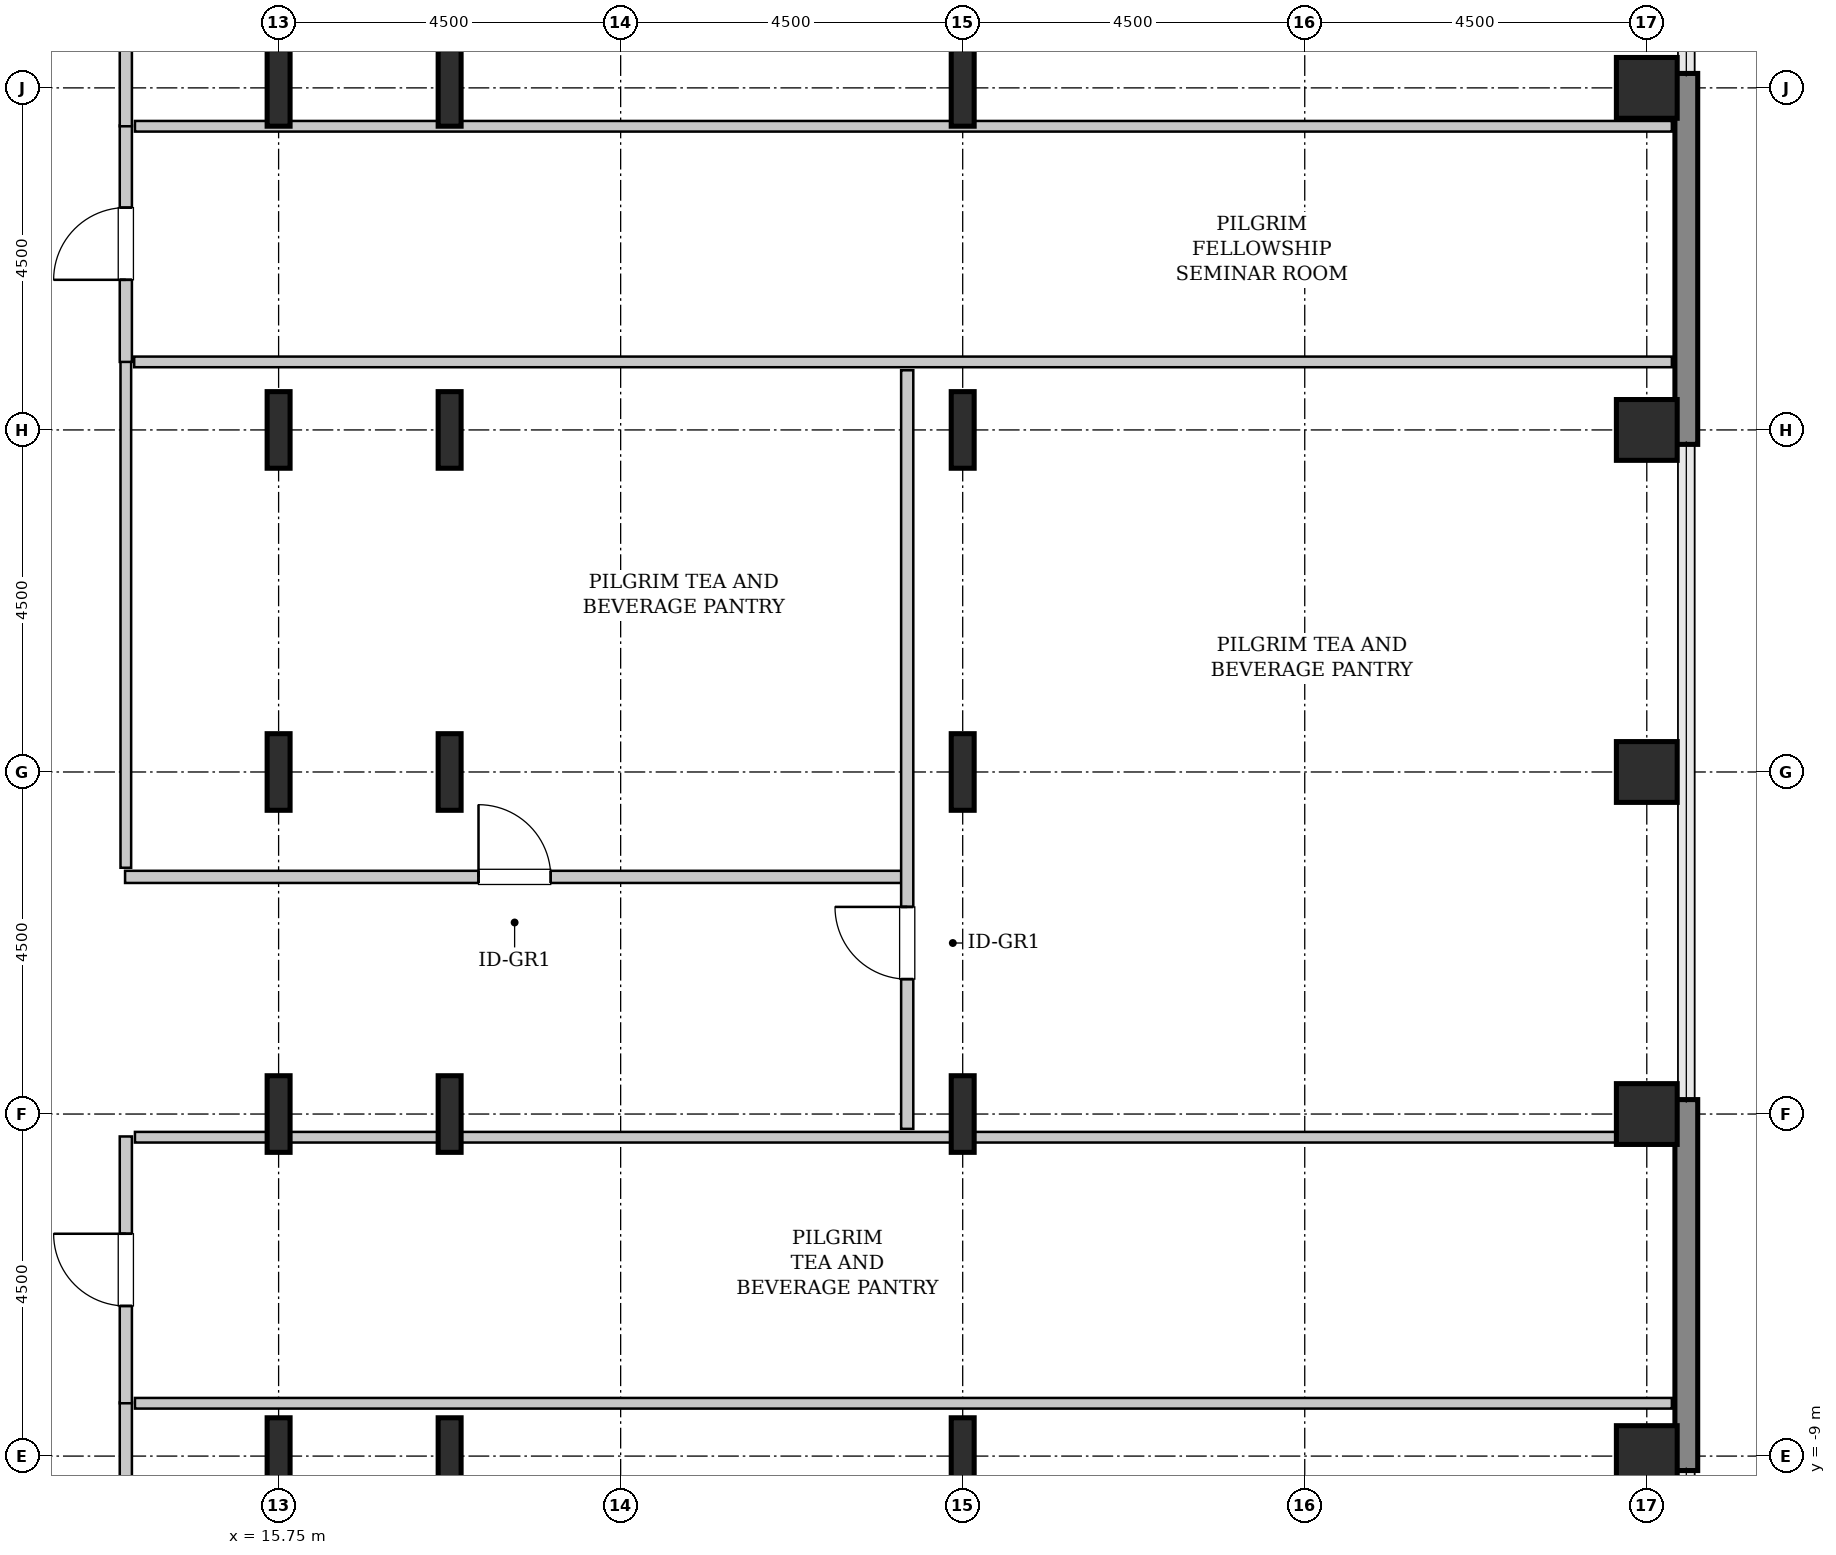
"""IFC4 building model, lengths in metres.
Left out: names, types, materials, properties, quantities, classifications, styles, units other than length and angle.
Written with IfcOpenShell. Run it as: python <this file> out.ifc"""

import sys

from ifc_helpers import new_model, si_unit, direction, frame, frame_2d, origin, origin_2d, place, context, subcontext, project, spatial, rectangle, hollow_rectangle, i_section, extrude, source, transform, mapped, element, fill, save


model = new_model("IFC4")
c1 = context("Model", 3, precision=1e-05, world=origin(), true_north=direction((0.0, 1.0)))
c2 = subcontext(c1, "Body", "Model", "MODEL_VIEW")
j1 = project(units=[si_unit("LENGTHUNIT", "METRE"), si_unit("PLANEANGLEUNIT", "RADIAN")], contexts=[c1])
p1 = place(None, origin())
s1 = spatial("IfcSite", under=j1, at=p1, CompositionType="ELEMENT")
p2 = place(p1, origin())
s2 = spatial("IfcBuilding", under=s1, at=p2, CompositionType="ELEMENT")
p3 = place(p2, frame((0.0, 0.0, 125.0)))
s3 = spatial("IfcBuildingStorey", under=s2, at=p3, CompositionType="ELEMENT", Elevation=125.0)
m1 = source(origin(), c2, "Body", "SweptSolid", [
    extrude(i_section(OverallWidth=0.302, OverallDepth=1.008, WebThickness=0.021, FlangeThickness=0.04, FilletRadius=0.03, at=origin_2d()), origin(), (0.0, 0.0, 1.0), 3.8),
])
for number, where, z_axis, x_axis in (
    (1, (15.75, -9.0, 0.0), (0.0, 0.0, 1.0), (1.0, 0.0, 0.0)),
    (2, (15.75, -4.5, 0.0), (0.0, 0.0, 1.0), (1.0, 0.0, 0.0)),
    (3, (15.75, 0.0, 0.0), (0.0, 0.0, 1.0), (1.0, 0.0, 0.0)),
    (4, (15.75, 4.5, 0.0), (0.0, 0.0, 1.0), (1.0, 0.0, 0.0)),
    (5, (15.75, 9.0, 0.0), (0.0, 0.0, 1.0), (1.0, 0.0, 0.0)),
    (6, (18.0, -9.0, 0.0), (0.0, 0.0, 1.0), (1.0, 0.0, 0.0)),
    (7, (18.0, -4.5, 0.0), (0.0, 0.0, 1.0), (1.0, 0.0, 0.0)),
    (8, (18.0, 0.0, 0.0), (0.0, 0.0, 1.0), (1.0, 0.0, 0.0)),
    (9, (18.0, 4.5, 0.0), (0.0, 0.0, 1.0), (1.0, 0.0, 0.0)),
    (10, (18.0, 9.0, 0.0), (0.0, 0.0, 1.0), (1.0, 0.0, 0.0)),
    (11, (24.75, -9.0, 0.0), (0.0, 0.0, 1.0), (1.0, 0.0, 0.0)),
    (12, (24.75, -4.5, 0.0), (0.0, 0.0, 1.0), (1.0, 0.0, 0.0)),
    (13, (24.75, 0.0, 0.0), (0.0, 0.0, 1.0), (1.0, 0.0, 0.0)),
    (14, (24.75, 4.5, 0.0), (0.0, 0.0, 1.0), (1.0, 0.0, 0.0)),
    (15, (24.75, 9.0, 0.0), (0.0, 0.0, 1.0), (1.0, 0.0, 0.0)),
):
    element("IfcColumn", number, at=place(p3, frame(where, z_axis=z_axis, x_axis=x_axis)), inside=s3, PredefinedType="COLUMN", context=c2, shape_type="MappedRepresentation", body=[
        mapped(m1, transform((0.0, 0.0, 0.0), x_axis=(1.0, 0.0, 0.0), y_axis=(0.0, 1.0, 0.0), z_axis=(0.0, 0.0, 1.0), scale=1.0)),
    ])
m2 = source(origin(), c2, "Body", "SweptSolid", [
    extrude(hollow_rectangle(XDim=0.8, YDim=0.8, WallThickness=0.04, InnerFilletRadius=0.04, OuterFilletRadius=0.08, at=origin_2d()), origin(), (0.0, 0.0, 1.0), 3.8),
])
for number, where, z_axis, x_axis in (
    (16, (33.75, -9.0, 0.0), (0.0, 0.0, 1.0), (1.0, 0.0, 0.0)),
    (17, (33.75, -4.5, 0.0), (0.0, 0.0, 1.0), (1.0, 0.0, 0.0)),
    (18, (33.75, 0.0, 0.0), (0.0, 0.0, 1.0), (1.0, 0.0, 0.0)),
    (19, (33.75, 4.5, 0.0), (0.0, 0.0, 1.0), (1.0, 0.0, 0.0)),
    (20, (33.75, 9.0, 0.0), (0.0, 0.0, 1.0), (1.0, 0.0, 0.0)),
):
    element("IfcColumn", number, at=place(p3, frame(where, z_axis=z_axis, x_axis=x_axis)), inside=s3, PredefinedType="COLUMN", context=c2, shape_type="MappedRepresentation", body=[
        mapped(m2, transform((0.0, 0.0, 0.0), x_axis=(1.0, 0.0, 0.0), y_axis=(0.0, 1.0, 0.0), z_axis=(0.0, 0.0, 1.0), scale=1.0)),
    ])
m3 = source(origin(), c2, "Body", "SweptSolid", [
    extrude(rectangle(XDim=4.88, YDim=0.3, at=frame_2d((2.44, 0.0))), origin(), (0.0, 0.0, 1.0), 3.55),
])
for number, where, z_axis, x_axis in (
    (21, (34.27, -9.19, 0.0), (0.0, 0.0, 1.0), (0.0, 1.0, 0.0)),
    (22, (34.27, 4.31, 0.0), (0.0, 0.0, 1.0), (0.0, 1.0, 0.0)),
):
    element("IfcWall", number, at=place(p3, frame(where, z_axis=z_axis, x_axis=x_axis)), inside=s3, PredefinedType="SHEAR", context=c2, shape_type="MappedRepresentation", body=[
        mapped(m3, transform((0.0, 0.0, 0.0), x_axis=(1.0, 0.0, 0.0), y_axis=(0.0, 1.0, 0.0), z_axis=(0.0, 0.0, 1.0), scale=1.0)),
    ])
m4 = source(origin(), c2, "Body", "SweptSolid", [
    extrude(rectangle(XDim=14.745, YDim=0.16, at=frame_2d((7.373, 0.0))), origin(), (0.0, 0.0, 1.0), 3.535),
])
p4 = place(p3, frame((13.74, -23.04, 0.0), z_axis=(0.0, 0.0, 1.0), x_axis=(0.0, 1.0, 0.0)))
e23 = element("IfcWall", 23, at=p4, inside=s3, PredefinedType="PARTITIONING", context=c2, shape_type="MappedRepresentation", body=[
    mapped(m4, transform((0.0, 0.0, 0.0), x_axis=(1.0, 0.0, 0.0), y_axis=(0.0, 1.0, 0.0), z_axis=(0.0, 0.0, 1.0), scale=1.0)),
])
p5 = place(p4, frame((12.663, 0.0, 0.0)))
e24 = element("IfcOpeningElement", 24, at=p5, cuts=e23, PredefinedType="OPENING", context=c2, shape_type="SweptSolid", body=[
    extrude(rectangle(XDim=0.95, YDim=2.1, at=frame_2d((0.475, 1.05))), frame((0.0, 0.09, 0.0), z_axis=(0.0, -1.0, 0.0), x_axis=(1.0, 0.0, 0.0)), (0.0, 0.0, 1.0), 0.18),
])
m5 = source(origin(), c2, "Body", "SweptSolid", [
    extrude(rectangle(XDim=20.22, YDim=0.14, at=frame_2d((10.11, 0.0))), origin(), (0.0, 0.0, 1.0), 3.535),
])
p6 = place(p3, frame((13.86, -8.305, 0.0), z_axis=(0.0, 0.0, 1.0), x_axis=(1.0, 0.0, 0.0)))
e25 = element("IfcWall", 25, at=p6, inside=s3, PredefinedType="PARTITIONING", context=c2, shape_type="MappedRepresentation", body=[
    mapped(m5, transform((0.0, 0.0, 0.0), x_axis=(1.0, 0.0, 0.0), y_axis=(0.0, 1.0, 0.0), z_axis=(0.0, 0.0, 1.0), scale=1.0)),
])
m6 = source(origin(), c2, "Body", "SweptSolid", [
    extrude(rectangle(XDim=3.51, YDim=0.16, at=frame_2d((1.755, 0.0))), origin(), (0.0, 0.0, 1.0), 3.535),
])
p7 = place(p3, frame((13.74, -8.305, 0.0), z_axis=(0.0, 0.0, 1.0), x_axis=(0.0, 1.0, 0.0)))
e26 = element("IfcWall", 26, at=p7, inside=s3, PredefinedType="PARTITIONING", context=c2, shape_type="MappedRepresentation", body=[
    mapped(m6, transform((0.0, 0.0, 0.0), x_axis=(1.0, 0.0, 0.0), y_axis=(0.0, 1.0, 0.0), z_axis=(0.0, 0.0, 1.0), scale=1.0)),
])
p8 = place(p7, frame((1.28, 0.0, 0.0)))
e27 = element("IfcOpeningElement", 27, at=p8, cuts=e26, PredefinedType="OPENING", context=c2, shape_type="SweptSolid", body=[
    extrude(rectangle(XDim=0.95, YDim=2.1, at=frame_2d((0.475, 1.05))), frame((0.0, 0.09, 0.0), z_axis=(0.0, -1.0, 0.0), x_axis=(1.0, 0.0, 0.0)), (0.0, 0.0, 1.0), 0.18),
])
m7 = source(origin(), c2, "Body", "SweptSolid", [
    extrude(rectangle(XDim=20.22, YDim=0.14, at=frame_2d((10.11, 0.0))), origin(), (0.0, 0.0, 1.0), 2.875),
])
p9 = place(p3, frame((13.86, -4.805, 0.0), z_axis=(0.0, 0.0, 1.0), x_axis=(1.0, 0.0, 0.0)))
e28 = element("IfcWall", 28, at=p9, inside=s3, PredefinedType="PARTITIONING", context=c2, shape_type="MappedRepresentation", body=[
    mapped(m7, transform((0.0, 0.0, 0.0), x_axis=(1.0, 0.0, 0.0), y_axis=(0.0, 1.0, 0.0), z_axis=(0.0, 0.0, 1.0), scale=1.0)),
])
m8 = source(origin(), c2, "Body", "SweptSolid", [
    extrude(rectangle(XDim=10.25, YDim=0.16, at=frame_2d((5.125, 0.0))), origin(), (0.0, 0.0, 1.0), 3.535),
])
p10 = place(p3, frame((13.73, -1.38, 0.0), z_axis=(0.0, 0.0, 1.0), x_axis=(1.0, 0.0, 0.0)))
e29 = element("IfcWall", 29, at=p10, inside=s3, PredefinedType="PARTITIONING", context=c2, shape_type="MappedRepresentation", body=[
    mapped(m8, transform((0.0, 0.0, 0.0), x_axis=(1.0, 0.0, 0.0), y_axis=(0.0, 1.0, 0.0), z_axis=(0.0, 0.0, 1.0), scale=1.0)),
])
p11 = place(p10, frame((4.65, 0.0, 0.0)))
e30 = element("IfcOpeningElement", 30, at=p11, cuts=e29, PredefinedType="OPENING", context=c2, shape_type="SweptSolid", body=[
    extrude(rectangle(XDim=0.95, YDim=2.1, at=frame_2d((0.475, 1.05))), frame((0.0, 0.09, 0.0), z_axis=(0.0, -1.0, 0.0), x_axis=(1.0, 0.0, 0.0)), (0.0, 0.0, 1.0), 0.18),
])
m9 = source(origin(), c2, "Body", "SweptSolid", [
    extrude(rectangle(XDim=6.665, YDim=0.14, at=frame_2d((3.333, 0.0))), origin(), (0.0, 0.0, 1.0), 3.535),
])
p12 = place(p3, frame((13.74, -1.26, 0.0), z_axis=(0.0, 0.0, 1.0), x_axis=(0.0, 1.0, 0.0)))
e31 = element("IfcWall", 31, at=p12, inside=s3, PredefinedType="PARTITIONING", context=c2, shape_type="MappedRepresentation", body=[
    mapped(m9, transform((0.0, 0.0, 0.0), x_axis=(1.0, 0.0, 0.0), y_axis=(0.0, 1.0, 0.0), z_axis=(0.0, 0.0, 1.0), scale=1.0)),
])
m10 = source(origin(), c2, "Body", "SweptSolid", [
    extrude(rectangle(XDim=20.23, YDim=0.14, at=frame_2d((10.115, 0.0))), origin(), (0.0, 0.0, 1.0), 3.535),
])
p13 = place(p3, frame((13.85, 5.395, 0.0), z_axis=(0.0, 0.0, 1.0), x_axis=(1.0, 0.0, 0.0)))
e32 = element("IfcWall", 32, at=p13, inside=s3, PredefinedType="PARTITIONING", context=c2, shape_type="MappedRepresentation", body=[
    mapped(m10, transform((0.0, 0.0, 0.0), x_axis=(1.0, 0.0, 0.0), y_axis=(0.0, 1.0, 0.0), z_axis=(0.0, 0.0, 1.0), scale=1.0)),
])
m11 = source(origin(), c2, "Body", "SweptSolid", [
    extrude(rectangle(XDim=9.98, YDim=0.16, at=frame_2d((4.99, 0.0))), origin(), (0.0, 0.0, 1.0), 3.535),
])
p14 = place(p3, frame((24.02, -4.695, 0.0), z_axis=(0.0, 0.0, 1.0), x_axis=(0.0, 1.0, 0.0)))
e33 = element("IfcWall", 33, at=p14, inside=s3, PredefinedType="PARTITIONING", context=c2, shape_type="MappedRepresentation", body=[
    mapped(m11, transform((0.0, 0.0, 0.0), x_axis=(1.0, 0.0, 0.0), y_axis=(0.0, 1.0, 0.0), z_axis=(0.0, 0.0, 1.0), scale=1.0)),
])
p15 = place(p14, frame((1.97, 0.0, 0.0)))
e34 = element("IfcOpeningElement", 34, at=p15, cuts=e33, PredefinedType="OPENING", context=c2, shape_type="SweptSolid", body=[
    extrude(rectangle(XDim=0.95, YDim=2.1, at=frame_2d((0.475, 1.05))), frame((0.0, 0.09, 0.0), z_axis=(0.0, -1.0, 0.0), x_axis=(1.0, 0.0, 0.0)), (0.0, 0.0, 1.0), 0.18),
])
m12 = source(origin(), c2, "Body", "SweptSolid", [
    extrude(rectangle(XDim=3.11, YDim=0.16, at=frame_2d((1.555, 0.0))), origin(), (0.0, 0.0, 1.0), 3.535),
])
p16 = place(p3, frame((13.74, 5.395, 0.0), z_axis=(0.0, 0.0, 1.0), x_axis=(0.0, 1.0, 0.0)))
e35 = element("IfcWall", 35, at=p16, inside=s3, PredefinedType="PARTITIONING", context=c2, shape_type="MappedRepresentation", body=[
    mapped(m12, transform((0.0, 0.0, 0.0), x_axis=(1.0, 0.0, 0.0), y_axis=(0.0, 1.0, 0.0), z_axis=(0.0, 0.0, 1.0), scale=1.0)),
])
p17 = place(p16, frame((1.08, 0.0, 0.0)))
e36 = element("IfcOpeningElement", 36, at=p17, cuts=e35, PredefinedType="OPENING", context=c2, shape_type="SweptSolid", body=[
    extrude(rectangle(XDim=0.95, YDim=2.1, at=frame_2d((0.475, 1.05))), frame((0.0, 0.09, 0.0), z_axis=(0.0, -1.0, 0.0), x_axis=(1.0, 0.0, 0.0)), (0.0, 0.0, 1.0), 0.18),
])
p18 = place(p3, frame((13.86, 8.495, 0.0), z_axis=(0.0, 0.0, 1.0), x_axis=(1.0, 0.0, 0.0)))
e37 = element("IfcWall", 37, at=p18, inside=s3, PredefinedType="PARTITIONING", context=c2, shape_type="MappedRepresentation", body=[
    mapped(m7, transform((0.0, 0.0, 0.0), x_axis=(1.0, 0.0, 0.0), y_axis=(0.0, 1.0, 0.0), z_axis=(0.0, 0.0, 1.0), scale=1.0)),
])
m13 = source(origin(), c2, "Body", "SweptSolid", [
    extrude(rectangle(XDim=14.545, YDim=0.16, at=frame_2d((7.272, 0.0))), origin(), (0.0, 0.0, 1.0), 3.535),
])
p19 = place(p3, frame((13.74, 8.495, 0.0), z_axis=(0.0, 0.0, 1.0), x_axis=(0.0, 1.0, 0.0)))
e38 = element("IfcWall", 38, at=p19, inside=s3, PredefinedType="PARTITIONING", context=c2, shape_type="MappedRepresentation", body=[
    mapped(m13, transform((0.0, 0.0, 0.0), x_axis=(1.0, 0.0, 0.0), y_axis=(0.0, 1.0, 0.0), z_axis=(0.0, 0.0, 1.0), scale=1.0)),
])
p20 = place(p19, frame((1.032, 0.0, 0.0)))
e39 = element("IfcOpeningElement", 39, at=p20, cuts=e38, PredefinedType="OPENING", context=c2, shape_type="SweptSolid", body=[
    extrude(rectangle(XDim=0.95, YDim=2.1, at=frame_2d((0.475, 1.05))), frame((0.0, 0.09, 0.0), z_axis=(0.0, -1.0, 0.0), x_axis=(1.0, 0.0, 0.0)), (0.0, 0.0, 1.0), 0.18),
])
m14 = source(origin(), c2, "Body", "SweptSolid", [
    extrude(rectangle(XDim=0.95, YDim=2.1, at=frame_2d((0.475, 1.05))), frame((0.0, 0.025, 0.0), z_axis=(0.0, -1.0, 0.0), x_axis=(1.0, 0.0, 0.0)), (0.0, 0.0, 1.0), 0.05),
])
p21 = place(p8, origin())
e40 = element("IfcDoor", 40, at=p21, inside=s3, OperationType="SINGLE_SWING_RIGHT", PredefinedType="DOOR", context=c2, shape_type="MappedRepresentation", body=[
    mapped(m14, transform((0.0, 0.0, 0.0), x_axis=(1.0, 0.0, 0.0), y_axis=(0.0, 1.0, 0.0), z_axis=(0.0, 0.0, 1.0), scale=1.0)),
])
fill(e27, e40)
p22 = place(p11, origin())
e41 = element("IfcDoor", 41, at=p22, inside=s3, OperationType="SINGLE_SWING_LEFT", PredefinedType="DOOR", context=c2, shape_type="MappedRepresentation", body=[
    mapped(m14, transform((0.0, 0.0, 0.0), x_axis=(1.0, 0.0, 0.0), y_axis=(0.0, 1.0, 0.0), z_axis=(0.0, 0.0, 1.0), scale=1.0)),
])
fill(e30, e41)
p23 = place(p15, origin())
e42 = element("IfcDoor", 42, at=p23, inside=s3, OperationType="SINGLE_SWING_RIGHT", PredefinedType="DOOR", context=c2, shape_type="MappedRepresentation", body=[
    mapped(m14, transform((0.0, 0.0, 0.0), x_axis=(1.0, 0.0, 0.0), y_axis=(0.0, 1.0, 0.0), z_axis=(0.0, 0.0, 1.0), scale=1.0)),
])
fill(e34, e42)
p24 = place(p17, origin())
e43 = element("IfcDoor", 43, at=p24, inside=s3, OperationType="SINGLE_SWING_LEFT", PredefinedType="DOOR", context=c2, shape_type="MappedRepresentation", body=[
    mapped(m14, transform((0.0, 0.0, 0.0), x_axis=(1.0, 0.0, 0.0), y_axis=(0.0, 1.0, 0.0), z_axis=(0.0, 0.0, 1.0), scale=1.0)),
])
fill(e36, e43)
save(model, sys.argv[1])
